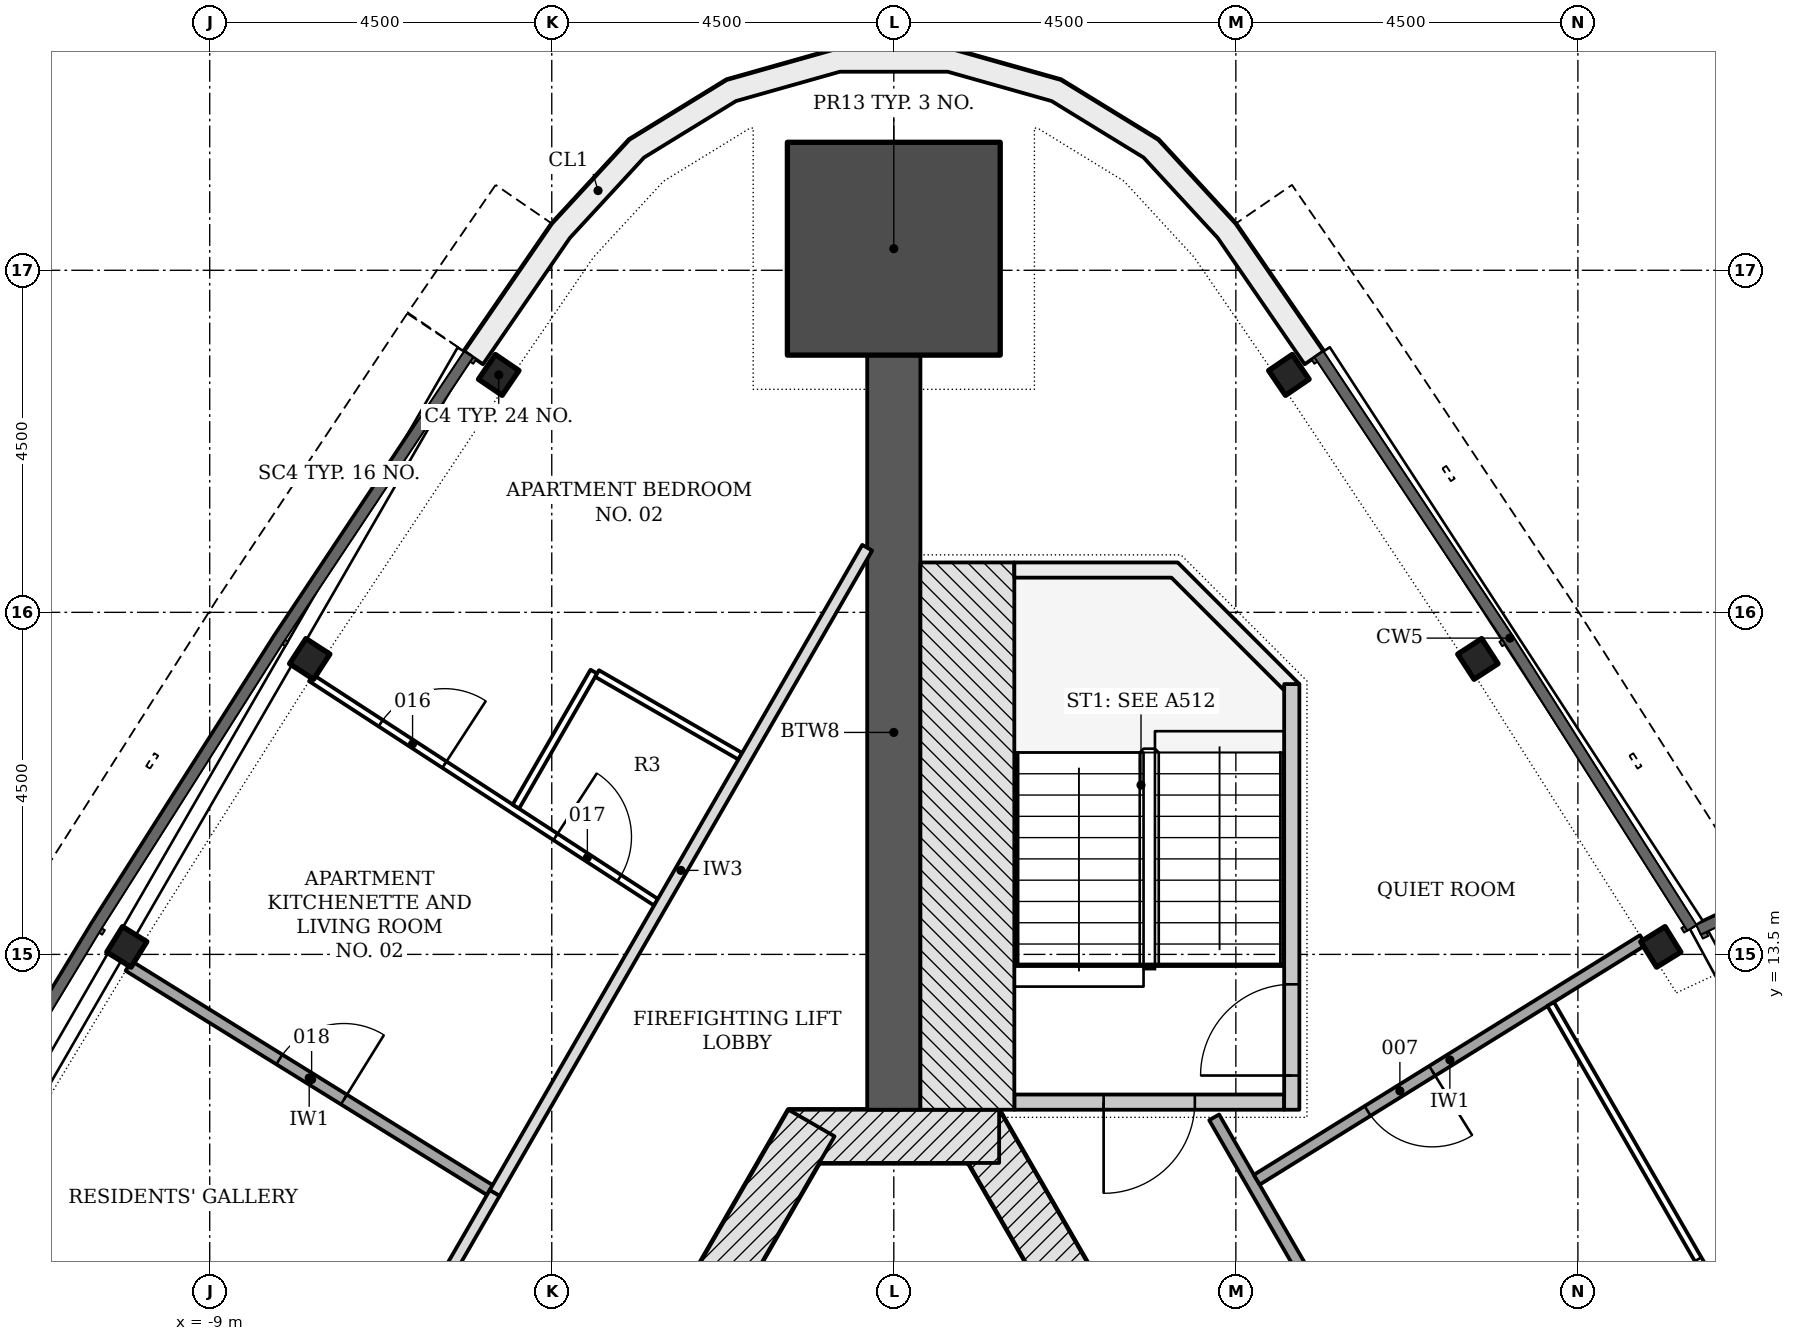
"""IFC4 building model, lengths in metres.
Left out: names, types, materials, properties, quantities, classifications, styles, units other than length and angle.
Written with IfcOpenShell. Run it as: python <this file> out.ifc"""

import sys

from ifc_helpers import new_model, si_unit, direction, frame, frame_2d, origin, origin_2d, place, context, subcontext, project, spatial, polyline, rectangle, i_section, outline, extrude, element, fill, save


model = new_model("IFC4")
c1 = context("Model", 3, precision=1e-05, world=origin(), true_north=direction((0.0, 1.0)))
c2 = subcontext(c1, "Body", "Model", "MODEL_VIEW")
j1 = project(units=[si_unit("LENGTHUNIT", "METRE"), si_unit("PLANEANGLEUNIT", "RADIAN")], contexts=[c1])
p1 = place(None, origin())
s1 = spatial("IfcSite", under=j1, at=p1, CompositionType="ELEMENT")
p2 = place(p1, origin())
s2 = spatial("IfcBuilding", under=s1, at=p2, CompositionType="ELEMENT")
p3 = place(p2, frame((0.0, 0.0, 174.3)))
s3 = spatial("IfcBuildingStorey", under=s2, at=p3, CompositionType="ELEMENT", Elevation=174.3)
p4 = place(p3, frame((10.311, -4.703, -0.2), z_axis=(0.0, 0.0, 1.0), x_axis=(-0.500001446645, 0.866024568562, 0.0)))
e1 = element("IfcWall", 1, at=p4, inside=s3, PredefinedType="SHEAR", context=c2, shape_type="SweptSolid", body=[
    extrude(rectangle(XDim=18.458, YDim=0.7, at=frame_2d((9.229, 0.0))), origin(), (0.0, 0.0, 1.0), 3.6),
])
p5 = place(p4, frame((4.379, 0.0, 0.2)))
e2 = element("IfcOpeningElement", 2, at=p5, cuts=e1, PredefinedType="OPENING", context=c2, shape_type="SweptSolid", body=[
    extrude(rectangle(XDim=1.1, YDim=2.1, at=frame_2d((0.55, 1.05))), frame((0.0, 0.36, 0.0), z_axis=(0.0, -1.0, 0.0), x_axis=(1.0, 0.0, 0.0)), (0.0, 0.0, 1.0), 0.72),
])
p6 = place(p4, frame((6.529, 0.0, 0.2)))
e3 = element("IfcOpeningElement", 3, at=p6, cuts=e1, PredefinedType="OPENING", context=c2, shape_type="SweptSolid", body=[
    extrude(rectangle(XDim=1.1, YDim=2.1, at=frame_2d((0.55, 1.05))), frame((0.0, 0.36, 0.0), z_axis=(0.0, -1.0, 0.0), x_axis=(1.0, 0.0, 0.0)), (0.0, 0.0, 1.0), 0.72),
])
p7 = place(p4, frame((8.679, 0.0, 0.2)))
e4 = element("IfcOpeningElement", 4, at=p7, cuts=e1, PredefinedType="OPENING", context=c2, shape_type="SweptSolid", body=[
    extrude(rectangle(XDim=1.1, YDim=2.1, at=frame_2d((0.55, 1.05))), frame((0.0, 0.36, 0.0), z_axis=(0.0, -1.0, 0.0), x_axis=(1.0, 0.0, 0.0)), (0.0, 0.0, 1.0), 0.72),
])
p8 = place(p4, frame((10.829, 0.0, 0.2)))
e5 = element("IfcOpeningElement", 5, at=p8, cuts=e1, PredefinedType="OPENING", context=c2, shape_type="SweptSolid", body=[
    extrude(rectangle(XDim=1.1, YDim=2.1, at=frame_2d((0.55, 1.05))), frame((0.0, 0.36, 0.0), z_axis=(0.0, -1.0, 0.0), x_axis=(1.0, 0.0, 0.0)), (0.0, 0.0, 1.0), 0.72),
])
p9 = place(p4, frame((12.979, 0.0, 0.2)))
e6 = element("IfcOpeningElement", 6, at=p9, cuts=e1, PredefinedType="OPENING", context=c2, shape_type="SweptSolid", body=[
    extrude(rectangle(XDim=1.1, YDim=2.1, at=frame_2d((0.55, 1.05))), frame((0.0, 0.36, 0.0), z_axis=(0.0, -1.0, 0.0), x_axis=(1.0, 0.0, 0.0)), (0.0, 0.0, 1.0), 0.72),
])
p10 = place(p3, frame((1.386, 11.106, -0.2), z_axis=(0.0, 0.0, 1.0), x_axis=(-1.0, 0.0, 0.0)))
e7 = element("IfcWall", 7, at=p10, inside=s3, PredefinedType="SHEAR", context=c2, shape_type="SweptSolid", body=[
    extrude(rectangle(XDim=2.771, YDim=0.7, at=frame_2d((1.386, 0.0))), origin(), (0.0, 0.0, 1.0), 3.6),
])
p11 = place(p3, frame((-1.083, 11.281, -0.2), z_axis=(0.0, 0.0, 1.0), x_axis=(-0.500001446645, -0.866024568562, 0.0)))
e8 = element("IfcWall", 8, at=p11, inside=s3, PredefinedType="SHEAR", context=c2, shape_type="SweptSolid", body=[
    extrude(rectangle(XDim=18.458, YDim=0.7, at=frame_2d((9.229, 0.0))), origin(), (0.0, 0.0, 1.0), 3.6),
])
p12 = place(p11, frame((8.979, 0.0, 0.2)))
e9 = element("IfcOpeningElement", 9, at=p12, cuts=e8, PredefinedType="OPENING", context=c2, shape_type="SweptSolid", body=[
    extrude(rectangle(XDim=1.2, YDim=2.1, at=frame_2d((0.6, 1.05))), frame((0.0, 0.36, 0.0), z_axis=(0.0, -1.0, 0.0), x_axis=(1.0, 0.0, 0.0)), (0.0, 0.0, 1.0), 0.72),
])
p13 = place(p11, frame((11.029, 0.0, 0.2)))
e10 = element("IfcOpeningElement", 10, at=p13, cuts=e8, PredefinedType="OPENING", context=c2, shape_type="SweptSolid", body=[
    extrude(rectangle(XDim=1.2, YDim=2.1, at=frame_2d((0.6, 1.05))), frame((0.0, 0.36, 0.0), z_axis=(0.0, -1.0, 0.0), x_axis=(1.0, 0.0, 0.0)), (0.0, 0.0, 1.0), 0.72),
])
p14 = place(p3, frame((0.0, 11.456, -0.2), z_axis=(0.0, 0.0, 1.0), x_axis=(0.0, 1.0, 0.0)))
e11 = element("IfcWall", 11, at=p14, inside=s3, PredefinedType="SHEAR", context=c2, shape_type="SweptSolid", body=[
    extrude(rectangle(XDim=9.928, YDim=0.7, at=frame_2d((4.964, 0.0))), origin(), (0.0, 0.0, 1.0), 3.6),
])
p15 = place(p3, frame((0.0, 22.784, -0.2), z_axis=(0.0, 0.0, 1.0), x_axis=(0.0, 1.0, 0.0)))
e12 = element("IfcColumn", 12, at=p15, inside=s3, PredefinedType="COLUMN", context=c2, shape_type="SweptSolid", body=[
    extrude(rectangle(XDim=2.8, YDim=2.8, at=origin_2d()), origin(), (0.0, 0.0, 1.0), 3.6),
])
for number, where, z_axis, x_axis in (
    (13, (-5.198, 21.124, -0.2), (0.0, 0.0, 1.0), (-0.563, -0.827, 0.0)),
    (14, (-7.684, 17.387, -0.2), (0.0, 0.0, 1.0), (-0.545, -0.838, 0.0)),
    (15, (-10.091, 13.599, -0.2), (0.0, 0.0, 1.0), (-0.527, -0.85, 0.0)),
    (16, (10.091, 13.599, -0.2), (0.0, 0.0, 1.0), (-0.527, 0.85, 0.0)),
    (17, (7.684, 17.387, -0.2), (0.0, 0.0, 1.0), (-0.545, 0.838, 0.0)),
    (18, (5.198, 21.124, -0.2), (0.0, 0.0, 1.0), (-0.563, 0.827, 0.0)),
):
    element("IfcColumn", number, at=place(p3, frame(where, z_axis=z_axis, x_axis=x_axis)), inside=s3, PredefinedType="COLUMN", context=c2, shape_type="SweptSolid", body=[
        extrude(i_section(OverallWidth=0.394, OverallDepth=0.376, WebThickness=0.017, FlangeThickness=0.028, FilletRadius=0.015, at=origin_2d()), origin(), (0.0, 0.0, 1.0), 3.6),
    ])
p16 = place(p3, origin())
e19 = element("IfcWall", 19, at=p16, inside=s3, PredefinedType="NOTDEFINED", context=c2, shape_type="SweptSolid", body=[
    extrude(outline(polyline([(5.652, 21.433), (4.497, 23.113), (3.478, 24.218), (2.198, 25.004), (0.751, 25.412), (-0.751, 25.412), (-2.198, 25.004), (-3.478, 24.218), (-4.497, 23.113), (-5.652, 21.433), (-5.405, 21.263), (-4.262, 22.926), (-3.286, 23.984), (-2.076, 24.727), (-0.71, 25.112), (0.71, 25.112), (2.076, 24.727), (3.286, 23.984), (4.262, 22.926), (5.405, 21.263), (5.652, 21.433)])), origin(), (0.0, 0.0, 1.0), 3.3),
])
p17 = place(p3, frame((5.135, 11.556, -0.2), z_axis=(0.0, 0.0, 1.0), x_axis=(-1.0, 0.0, 0.0)))
e20 = element("IfcWall", 20, at=p17, inside=s3, PredefinedType="SHEAR", context=c2, shape_type="SweptSolid", body=[
    extrude(rectangle(XDim=3.55, YDim=0.2, at=frame_2d((1.775, 0.0))), origin(), (0.0, 0.0, 1.0), 3.6),
])
p18 = place(p17, frame((1.175, 0.0, 0.2)))
e21 = element("IfcOpeningElement", 21, at=p18, cuts=e20, PredefinedType="OPENING", context=c2, shape_type="SweptSolid", body=[
    extrude(rectangle(XDim=1.2, YDim=2.1, at=frame_2d((0.6, 1.05))), frame((0.0, 0.11, 0.0), z_axis=(0.0, -1.0, 0.0), x_axis=(1.0, 0.0, 0.0)), (0.0, 0.0, 1.0), 0.22),
])
p19 = place(p3, frame((5.236, 11.456, -0.2), z_axis=(0.0, 0.0, 1.0), x_axis=(0.0, 1.0, 0.0)))
e22 = element("IfcWall", 22, at=p19, inside=s3, PredefinedType="SHEAR", context=c2, shape_type="SweptSolid", body=[
    extrude(rectangle(XDim=5.6, YDim=0.2, at=frame_2d((2.8, 0.0))), origin(), (0.0, 0.0, 1.0), 3.6),
])
p20 = place(p19, frame((0.45, 0.0, 0.2)))
e23 = element("IfcOpeningElement", 23, at=p20, cuts=e22, PredefinedType="OPENING", context=c2, shape_type="SweptSolid", body=[
    extrude(rectangle(XDim=1.2, YDim=2.1, at=frame_2d((0.6, 1.05))), frame((0.0, 0.11, 0.0), z_axis=(0.0, -1.0, 0.0), x_axis=(1.0, 0.0, 0.0)), (0.0, 0.0, 1.0), 0.22),
])
p21 = place(p3, frame((0.968, 11.456, -0.2), z_axis=(0.0, 0.0, 1.0), x_axis=(0.0, 1.0, 0.0)))
e24 = element("IfcWall", 24, at=p21, inside=s3, PredefinedType="SHEAR", context=c2, shape_type="SweptSolid", body=[
    extrude(rectangle(XDim=7.2, YDim=1.236, at=frame_2d((3.6, 0.0))), origin(), (0.0, 0.0, 1.0), 3.6),
])
p22 = place(p3, frame((0.0, 0.0, -0.2)))
e25 = element("IfcWall", 25, at=p22, inside=s3, PredefinedType="SHEAR", context=c2, shape_type="SweptSolid", body=[
    extrude(outline(polyline([(5.336, 17.056), (3.736, 18.656), (1.586, 18.656), (1.586, 18.456), (3.653, 18.456), (5.135, 16.974), (5.135, 17.056), (5.135, 17.056), (5.135, 17.056), (5.135, 17.056), (5.135, 17.056), (5.135, 17.056), (5.135, 17.056), (5.135, 17.056), (5.135, 17.056), (5.135, 17.056), (5.135, 17.056), (5.135, 17.056), (5.135, 17.056), (5.135, 17.056), (5.135, 17.056), (5.135, 17.056), (5.135, 17.056), (5.336, 17.056)])), origin(), (0.0, 0.0, 1.0), 3.6),
])
p23 = place(p3, frame((15.807, -8.722, 0.0), z_axis=(0.0, 0.0, 1.0), x_axis=(-0.500001078133, 0.866024781323, 0.0)))
e26 = element("IfcWall", 26, at=p23, inside=s3, PredefinedType="PARTITIONING", context=c2, shape_type="SweptSolid", body=[
    extrude(rectangle(XDim=23.185, YDim=0.15, at=frame_2d((11.592, 0.0))), origin(), (0.0, 0.0, 1.0), 2.847),
])
p24 = place(p23, frame((10.551, 0.0, 0.0)))
e27 = element("IfcOpeningElement", 27, at=p24, cuts=e26, PredefinedType="OPENING", context=c2, shape_type="SweptSolid", body=[
    extrude(rectangle(XDim=1.5, YDim=2.1, at=frame_2d((0.75, 1.05))), frame((0.0, 0.085, 0.0), z_axis=(0.0, -1.0, 0.0), x_axis=(1.0, 0.0, 0.0)), (0.0, 0.0, 1.0), 0.17),
])
p25 = place(p23, frame((17.335, 0.0, 0.0)))
e28 = element("IfcOpeningElement", 28, at=p25, cuts=e26, PredefinedType="OPENING", context=c2, shape_type="SweptSolid", body=[
    extrude(rectangle(XDim=1.0, YDim=2.1, at=frame_2d((0.5, 1.05))), frame((0.0, 0.085, 0.0), z_axis=(0.0, -1.0, 0.0), x_axis=(1.0, 0.0, 0.0)), (0.0, 0.0, 1.0), 0.17),
])
p26 = place(p3, frame((9.856, 13.688, 0.0), z_axis=(0.0, 0.0, 1.0), x_axis=(-0.849698198213, -0.527269354271, 0.0)))
e29 = element("IfcWall", 29, at=p26, inside=s3, PredefinedType="PARTITIONING", context=c2, shape_type="SweptSolid", body=[
    extrude(rectangle(XDim=5.979, YDim=0.15, at=frame_2d((2.99, 0.0))), origin(), (0.0, 0.0, 1.0), 3.4),
])
p27 = place(p26, frame((3.264, 0.0, 0.0)))
e30 = element("IfcOpeningElement", 30, at=p27, cuts=e29, PredefinedType="OPENING", context=c2, shape_type="SweptSolid", body=[
    extrude(rectangle(XDim=1.0, YDim=2.1, at=frame_2d((0.5, 1.05))), frame((0.0, 0.085, 0.0), z_axis=(0.0, -1.0, 0.0), x_axis=(1.0, 0.0, 0.0)), (0.0, 0.0, 1.0), 0.17),
])
p28 = place(p3, frame((13.032, 5.243, 0.0), z_axis=(0.0, 0.0, 1.0), x_axis=(-0.499996840937, 0.866027227663, 0.0)))
e31 = element("IfcWall", 31, at=p28, inside=s3, PredefinedType="PARTITIONING", context=c2, shape_type="SweptSolid", body=[
    extrude(rectangle(XDim=8.78, YDim=0.1, at=frame_2d((4.39, 0.0))), origin(), (0.0, 0.0, 1.0), 2.847),
])
p29 = place(p28, frame((3.903, 0.0, 0.0)))
e32 = element("IfcOpeningElement", 32, at=p29, cuts=e31, PredefinedType="OPENING", context=c2, shape_type="SweptSolid", body=[
    extrude(rectangle(XDim=1.0, YDim=2.1, at=frame_2d((0.5, 1.05))), frame((0.0, 0.06, 0.0), z_axis=(0.0, -1.0, 0.0), x_axis=(1.0, 0.0, 0.0)), (0.0, 0.0, 1.0), 0.12),
])
p30 = place(p3, frame((-0.35, 18.85, 0.0), z_axis=(0.0, 0.0, 1.0), x_axis=(-0.499985463203, -0.866033796445, 0.0)))
e33 = element("IfcWall", 33, at=p30, inside=s3, PredefinedType="PARTITIONING", context=c2, shape_type="SweptSolid", body=[
    extrude(rectangle(XDim=9.803, YDim=0.15, at=frame_2d((4.901, 0.0))), origin(), (0.0, 0.0, 1.0), 2.847),
])
p31 = place(p3, frame((-10.067, 13.348, 0.0), z_axis=(0.0, 0.0, 1.0), x_axis=(0.84969615017, -0.527272654692, 0.0)))
e34 = element("IfcWall", 34, at=p31, inside=s3, PredefinedType="PARTITIONING", context=c2, shape_type="SweptSolid", body=[
    extrude(rectangle(XDim=5.592, YDim=0.15, at=frame_2d((2.796, 0.0))), origin(), (0.0, 0.0, 1.0), 3.4),
])
p32 = place(p31, frame((2.333, 0.0, 0.0)))
e35 = element("IfcOpeningElement", 35, at=p32, cuts=e34, PredefinedType="OPENING", context=c2, shape_type="SweptSolid", body=[
    extrude(rectangle(XDim=1.0, YDim=2.1, at=frame_2d((0.5, 1.05))), frame((0.0, 0.085, 0.0), z_axis=(0.0, -1.0, 0.0), x_axis=(1.0, 0.0, 0.0)), (0.0, 0.0, 1.0), 0.17),
])
p33 = place(p3, frame((-12.388, 9.51, 0.0), z_axis=(0.0, 0.0, 1.0), x_axis=(0.860691995407, -0.509126005073, 0.0)))
e36 = element("IfcWall", 36, at=p33, inside=s3, PredefinedType="PARTITIONING", context=c2, shape_type="SweptSolid", body=[
    extrude(rectangle(XDim=5.68, YDim=0.15, at=frame_2d((2.84, 0.0))), origin(), (0.0, 0.0, 1.0), 3.4),
])
p34 = place(p33, frame((2.378, 0.0, 0.0)))
e37 = element("IfcOpeningElement", 37, at=p34, cuts=e36, PredefinedType="OPENING", context=c2, shape_type="SweptSolid", body=[
    extrude(rectangle(XDim=1.0, YDim=2.1, at=frame_2d((0.5, 1.05))), frame((0.0, 0.085, 0.0), z_axis=(0.0, -1.0, 0.0), x_axis=(1.0, 0.0, 0.0)), (0.0, 0.0, 1.0), 0.17),
])
p35 = place(p3, frame((-5.251, 10.36, 0.0), z_axis=(0.0, 0.0, 1.0), x_axis=(-0.500012937857, -0.86601793398, 0.0)))
e38 = element("IfcWall", 38, at=p35, inside=s3, PredefinedType="PARTITIONING", context=c2, shape_type="SweptSolid", body=[
    extrude(rectangle(XDim=4.365, YDim=0.15, at=frame_2d((2.183, 0.0))), origin(), (0.0, 0.0, 1.0), 2.847),
])
p36 = place(p35, frame((1.683, 0.0, 0.0)))
e39 = element("IfcOpeningElement", 39, at=p36, cuts=e38, PredefinedType="OPENING", context=c2, shape_type="SweptSolid", body=[
    extrude(rectangle(XDim=1.0, YDim=2.1, at=frame_2d((0.5, 1.05))), frame((0.0, 0.085, 0.0), z_axis=(0.0, -1.0, 0.0), x_axis=(1.0, 0.0, 0.0)), (0.0, 0.0, 1.0), 0.17),
])
p37 = place(p3, frame((-7.666, 17.136, 0.0), z_axis=(0.0, 0.0, 1.0), x_axis=(0.838353922252, -0.545126316595, 0.0)))
e40 = element("IfcWall", 40, at=p37, inside=s3, PredefinedType="PARTITIONING", context=c2, shape_type="SweptSolid", body=[
    extrude(rectangle(XDim=5.411, YDim=0.1, at=frame_2d((2.706, 0.0))), origin(), (0.0, 0.0, 1.0), 3.4),
])
p38 = place(p37, frame((1.092, 0.0, 0.0)))
e41 = element("IfcOpeningElement", 41, at=p38, cuts=e40, PredefinedType="OPENING", context=c2, shape_type="SweptSolid", body=[
    extrude(rectangle(XDim=1.0, YDim=2.1, at=frame_2d((0.5, 1.05))), frame((0.0, 0.06, 0.0), z_axis=(0.0, -1.0, 0.0), x_axis=(1.0, 0.0, 0.0)), (0.0, 0.0, 1.0), 0.12),
])
p39 = place(p37, frame((3.835, 0.0, 0.0)))
e42 = element("IfcOpeningElement", 42, at=p39, cuts=e40, PredefinedType="OPENING", context=c2, shape_type="SweptSolid", body=[
    extrude(rectangle(XDim=1.0, YDim=2.1, at=frame_2d((0.5, 1.05))), frame((0.0, 0.06, 0.0), z_axis=(0.0, -1.0, 0.0), x_axis=(1.0, 0.0, 0.0)), (0.0, 0.0, 1.0), 0.12),
])
p40 = place(p3, frame((-4.972, 15.445, 0.0), z_axis=(0.0, 0.0, 1.0), x_axis=(0.499956128963, 0.866050731258, 0.0)))
e43 = element("IfcWall", 43, at=p40, inside=s3, PredefinedType="PARTITIONING", context=c2, shape_type="SweptSolid", body=[
    extrude(rectangle(XDim=2.05, YDim=0.1, at=frame_2d((1.025, 0.0))), origin(), (0.0, 0.0, 1.0), 2.847),
])
p41 = place(p3, frame((-3.904, 17.195, 0.0), z_axis=(0.0, 0.0, 1.0), x_axis=(0.866065968399, -0.499929733443, 0.0)))
e44 = element("IfcWall", 44, at=p41, inside=s3, PredefinedType="PARTITIONING", context=c2, shape_type="SweptSolid", body=[
    extrude(rectangle(XDim=2.175, YDim=0.1, at=frame_2d((1.087, 0.0))), origin(), (0.0, 0.0, 1.0), 3.4),
])
p42 = place(p18, origin())
e45 = element("IfcDoor", 45, at=p42, inside=s3, OperationType="SINGLE_SWING_RIGHT", PredefinedType="DOOR", context=c2, shape_type="SweptSolid", body=[
    extrude(rectangle(XDim=1.2, YDim=2.1, at=frame_2d((0.6, 1.05))), frame((0.0, 0.025, 0.0), z_axis=(0.0, -1.0, 0.0), x_axis=(1.0, 0.0, 0.0)), (0.0, 0.0, 1.0), 0.05),
])
fill(e21, e45)
p43 = place(p20, origin())
e46 = element("IfcDoor", 46, at=p43, inside=s3, OperationType="SINGLE_SWING_LEFT", PredefinedType="DOOR", context=c2, shape_type="SweptSolid", body=[
    extrude(rectangle(XDim=1.2, YDim=2.1, at=frame_2d((0.6, 1.05))), frame((0.0, 0.025, 0.0), z_axis=(0.0, -1.0, 0.0), x_axis=(1.0, 0.0, 0.0)), (0.0, 0.0, 1.0), 0.05),
])
fill(e23, e46)
p44 = place(p29, origin())
e47 = element("IfcDoor", 47, at=p44, inside=s3, OperationType="SINGLE_SWING_LEFT", PredefinedType="DOOR", context=c2, shape_type="SweptSolid", body=[
    extrude(rectangle(XDim=1.0, YDim=2.1, at=frame_2d((0.5, 1.05))), frame((0.0, 0.025, 0.0), z_axis=(0.0, -1.0, 0.0), x_axis=(1.0, 0.0, 0.0)), (0.0, 0.0, 1.0), 0.05),
])
fill(e32, e47)
p45 = place(p27, origin())
e48 = element("IfcDoor", 48, at=p45, inside=s3, OperationType="SINGLE_SWING_LEFT", PredefinedType="DOOR", context=c2, shape_type="SweptSolid", body=[
    extrude(rectangle(XDim=1.0, YDim=2.1, at=frame_2d((0.5, 1.05))), frame((0.0, 0.025, 0.0), z_axis=(0.0, -1.0, 0.0), x_axis=(1.0, 0.0, 0.0)), (0.0, 0.0, 1.0), 0.05),
])
fill(e30, e48)
p46 = place(p38, origin())
e49 = element("IfcDoor", 49, at=p46, inside=s3, OperationType="SINGLE_SWING_RIGHT", PredefinedType="DOOR", context=c2, shape_type="SweptSolid", body=[
    extrude(rectangle(XDim=1.0, YDim=2.1, at=frame_2d((0.5, 1.05))), frame((0.0, 0.025, 0.0), z_axis=(0.0, -1.0, 0.0), x_axis=(1.0, 0.0, 0.0)), (0.0, 0.0, 1.0), 0.05),
])
fill(e41, e49)
p47 = place(p39, origin())
e50 = element("IfcDoor", 50, at=p47, inside=s3, OperationType="SINGLE_SWING_LEFT", PredefinedType="DOOR", context=c2, shape_type="SweptSolid", body=[
    extrude(rectangle(XDim=1.0, YDim=2.1, at=frame_2d((0.5, 1.05))), frame((0.0, 0.025, 0.0), z_axis=(0.0, -1.0, 0.0), x_axis=(1.0, 0.0, 0.0)), (0.0, 0.0, 1.0), 0.05),
])
fill(e42, e50)
p48 = place(p32, origin())
e51 = element("IfcDoor", 51, at=p48, inside=s3, OperationType="SINGLE_SWING_RIGHT", PredefinedType="DOOR", context=c2, shape_type="SweptSolid", body=[
    extrude(rectangle(XDim=1.0, YDim=2.1, at=frame_2d((0.5, 1.05))), frame((0.0, 0.025, 0.0), z_axis=(0.0, -1.0, 0.0), x_axis=(1.0, 0.0, 0.0)), (0.0, 0.0, 1.0), 0.05),
])
fill(e35, e51)
save(model, sys.argv[1])
